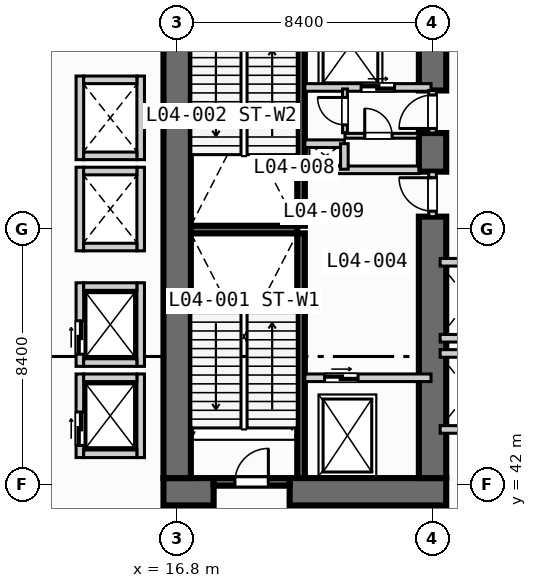
"""IFC4 building model, lengths in metres.
Left out: names, types, materials, properties, quantities, classifications, styles, units other than length and angle.
Written with IfcOpenShell. Run it as: python <this file> out.ifc"""

import sys

from ifc_helpers import new_model, si_unit, direction, frame, frame_2d, origin, place, context, subcontext, project, spatial, rectangle, extrude, element, fill, save


model = new_model("IFC4")
c1 = context("Model", 3, precision=1e-05, world=origin(), true_north=direction((0.0, 1.0)))
c2 = subcontext(c1, "Body", "Model", "MODEL_VIEW")
j1 = project(units=[si_unit("LENGTHUNIT", "METRE"), si_unit("PLANEANGLEUNIT", "RADIAN")], contexts=[c1])
p1 = place(None, origin())
s1 = spatial("IfcSite", under=j1, at=p1, CompositionType="ELEMENT")
p2 = place(p1, origin())
s2 = spatial("IfcBuilding", under=s1, at=p2, CompositionType="ELEMENT")
p3 = place(p2, frame((0.0, 0.0, 20.8)))
s3 = spatial("IfcBuildingStorey", under=s2, at=p3, CompositionType="ELEMENT", Elevation=20.8)
for number, where, z_axis, x_axis in (
    (1, (20.875, 42.2, 0.0), (0.0, 0.0, 1.0), (0.0, 1.0, 0.0)),
    (2, (20.875, 50.5, 0.0), (0.0, 0.0, 1.0), (0.0, 1.0, 0.0)),
):
    element("IfcWall", number, at=place(p3, frame(where, z_axis=z_axis, x_axis=x_axis)), inside=s3, PredefinedType="SOLIDWALL", context=c2, shape_type="SweptSolid", body=[
        extrude(rectangle(XDim=8.05, YDim=0.25, at=frame_2d((4.025, 0.0))), origin(), (0.0, 0.0, 1.0), 4.75),
    ])
p4 = place(p3, frame((17.25, 50.375, 0.0), z_axis=(0.0, 0.0, 1.0), x_axis=(1.0, 0.0, 0.0)))
e3 = element("IfcWall", 3, at=p4, inside=s3, PredefinedType="SOLIDWALL", context=c2, shape_type="SweptSolid", body=[
    extrude(rectangle(XDim=3.5, YDim=0.25, at=frame_2d((1.75, 0.0))), origin(), (0.0, 0.0, 1.0), 4.75),
])
p5 = place(p3, frame((16.35, 41.75, 0.0), z_axis=(0.0, 0.0, 1.0), x_axis=(1.0, 0.0, 0.0)))
e4 = element("IfcWall", 4, at=p5, inside=s3, PredefinedType="SHEAR", context=c2, shape_type="SweptSolid", body=[
    extrude(rectangle(XDim=1.65, YDim=0.9, at=frame_2d((0.825, 0.0))), origin(), (0.0, 0.0, 1.0), 4.75),
])
p6 = place(p3, frame((20.5, 41.75, 0.0), z_axis=(0.0, 0.0, 1.0), x_axis=(1.0, 0.0, 0.0)))
e5 = element("IfcWall", 5, at=p6, inside=s3, PredefinedType="SHEAR", context=c2, shape_type="SweptSolid", body=[
    extrude(rectangle(XDim=5.15, YDim=0.9, at=frame_2d((2.575, 0.0))), origin(), (0.0, 0.0, 1.0), 4.75),
])
p7 = place(p3, frame((16.8, 42.2, 0.0), z_axis=(0.0, 0.0, 1.0), x_axis=(0.0, 1.0, 0.0)))
e6 = element("IfcWall", 6, at=p7, inside=s3, PredefinedType="SHEAR", context=c2, shape_type="SweptSolid", body=[
    extrude(rectangle(XDim=16.35, YDim=0.9, at=frame_2d((8.175, 0.0))), origin(), (0.0, 0.0, 1.0), 4.75),
])
p8 = place(p3, frame((25.2, 42.2, 0.0), z_axis=(0.0, 0.0, 1.0), x_axis=(0.0, 1.0, 0.0)))
e7 = element("IfcWall", 7, at=p8, inside=s3, PredefinedType="SHEAR", context=c2, shape_type="SweptSolid", body=[
    extrude(rectangle(XDim=8.6, YDim=0.9, at=frame_2d((4.3, 0.0))), origin(), (0.0, 0.0, 1.0), 4.75),
])
p9 = place(p3, frame((25.2, 52.28, 0.0), z_axis=(0.0, 0.0, 1.0), x_axis=(0.0, 1.0, 0.0)))
e8 = element("IfcWall", 8, at=p9, inside=s3, PredefinedType="SHEAR", context=c2, shape_type="SweptSolid", body=[
    extrude(rectangle(XDim=1.27, YDim=0.9, at=frame_2d((0.635, 0.0))), origin(), (0.0, 0.0, 1.0), 4.75),
])
p10 = place(p3, frame((25.2, 54.95, 0.0), z_axis=(0.0, 0.0, 1.0), x_axis=(0.0, 1.0, 0.0)))
e9 = element("IfcWall", 9, at=p10, inside=s3, PredefinedType="SHEAR", context=c2, shape_type="SweptSolid", body=[
    extrude(rectangle(XDim=3.6, YDim=0.9, at=frame_2d((1.8, 0.0))), origin(), (0.0, 0.0, 1.0), 4.75),
])
p11 = place(p3, frame((18.0, 42.075, 0.0), z_axis=(0.0, 0.0, 1.0), x_axis=(1.0, 0.0, 0.0)))
e10 = element("IfcWall", 10, at=p11, inside=s3, PredefinedType="SOLIDWALL", context=c2, shape_type="SweptSolid", body=[
    extrude(rectangle(XDim=2.5, YDim=0.25, at=frame_2d((1.25, 0.0))), origin(), (0.0, 0.0, 1.0), 4.75),
])
p12 = place(p11, frame((0.7, 0.0, 0.0)))
e11 = element("IfcOpeningElement", 11, at=p12, cuts=e10, PredefinedType="OPENING", context=c2, shape_type="SweptSolid", body=[
    extrude(rectangle(XDim=1.1, YDim=2.15, at=frame_2d((0.55, 1.075))), frame((0.0, 0.135, 0.0), z_axis=(0.0, -1.0, 0.0), x_axis=(1.0, 0.0, 0.0)), (0.0, 0.0, 1.0), 0.27),
])
p13 = place(p3, frame((21.0, 45.5, 0.0), z_axis=(0.0, 0.0, 1.0), x_axis=(1.0, 0.0, 0.0)))
e12 = element("IfcWall", 12, at=p13, inside=s3, PredefinedType="SOLIDWALL", context=c2, shape_type="SweptSolid", body=[
    extrude(rectangle(XDim=4.15, YDim=0.25, at=frame_2d((2.075, 0.0))), origin(), (0.0, 0.0, 1.0), 4.75),
])
p14 = place(p13, frame((0.65, 0.0, 0.0)))
e13 = element("IfcOpeningElement", 13, at=p14, cuts=e12, PredefinedType="OPENING", context=c2, shape_type="SweptSolid", body=[
    extrude(rectangle(XDim=1.1, YDim=2.15, at=frame_2d((0.55, 1.075))), frame((0.0, 0.135, 0.0), z_axis=(0.0, -1.0, 0.0), x_axis=(1.0, 0.0, 0.0)), (0.0, 0.0, 1.0), 0.27),
])
p15 = place(p3, frame((25.2, 50.8, 0.0), z_axis=(0.0, 0.0, 1.0), x_axis=(0.0, 1.0, 0.0)))
e14 = element("IfcWall", 14, at=p15, inside=s3, PredefinedType="SOLIDWALL", context=c2, shape_type="SweptSolid", body=[
    extrude(rectangle(XDim=1.48, YDim=0.25, at=frame_2d((0.74, 0.0))), origin(), (0.0, 0.0, 1.0), 4.75),
])
p16 = place(p15, frame((0.18, 0.0, 0.0)))
e15 = element("IfcOpeningElement", 15, at=p16, cuts=e14, PredefinedType="OPENING", context=c2, shape_type="SweptSolid", body=[
    extrude(rectangle(XDim=1.1, YDim=2.15, at=frame_2d((0.55, 1.075))), frame((0.0, 0.135, 0.0), z_axis=(0.0, -1.0, 0.0), x_axis=(1.0, 0.0, 0.0)), (0.0, 0.0, 1.0), 0.27),
])
p17 = place(p3, frame((21.0, 52.34, 0.0), z_axis=(0.0, 0.0, 1.0), x_axis=(1.0, 0.0, 0.0)))
e16 = element("IfcWall", 16, at=p17, inside=s3, PredefinedType="SOLIDWALL", context=c2, shape_type="SweptSolid", body=[
    extrude(rectangle(XDim=3.75, YDim=0.25, at=frame_2d((1.875, 0.0))), origin(), (0.0, 0.0, 1.0), 4.75),
])
p18 = place(p3, frame((21.0, 55.05, 0.0), z_axis=(0.0, 0.0, 1.0), x_axis=(1.0, 0.0, 0.0)))
e17 = element("IfcWall", 17, at=p18, inside=s3, PredefinedType="SOLIDWALL", context=c2, shape_type="SweptSolid", body=[
    extrude(rectangle(XDim=4.15, YDim=0.25, at=frame_2d((2.075, 0.0))), origin(), (0.0, 0.0, 1.0), 4.75),
])
p19 = place(p18, frame((1.85, 0.0, 0.0)))
e18 = element("IfcOpeningElement", 18, at=p19, cuts=e17, PredefinedType="OPENING", context=c2, shape_type="SweptSolid", body=[
    extrude(rectangle(XDim=1.1, YDim=2.15, at=frame_2d((0.55, 1.075))), frame((0.0, 0.135, 0.0), z_axis=(0.0, -1.0, 0.0), x_axis=(1.0, 0.0, 0.0)), (0.0, 0.0, 1.0), 0.27),
])
p20 = place(p3, frame((25.2, 53.55, 0.0), z_axis=(0.0, 0.0, 1.0), x_axis=(0.0, 1.0, 0.0)))
e19 = element("IfcWall", 19, at=p20, inside=s3, PredefinedType="SOLIDWALL", context=c2, shape_type="SweptSolid", body=[
    extrude(rectangle(XDim=1.4, YDim=0.25, at=frame_2d((0.7, 0.0))), origin(), (0.0, 0.0, 1.0), 4.75),
])
p21 = place(p20, frame((0.15, 0.0, 0.0)))
e20 = element("IfcOpeningElement", 20, at=p21, cuts=e19, PredefinedType="OPENING", context=c2, shape_type="SweptSolid", body=[
    extrude(rectangle(XDim=1.1, YDim=2.15, at=frame_2d((0.55, 1.075))), frame((0.0, 0.135, 0.0), z_axis=(0.0, -1.0, 0.0), x_axis=(1.0, 0.0, 0.0)), (0.0, 0.0, 1.0), 0.27),
])
p22 = place(p3, frame((21.0, 53.2, 0.0), z_axis=(0.0, 0.0, 1.0), x_axis=(1.0, 0.0, 0.0)))
e21 = element("IfcWall", 21, at=p22, inside=s3, PredefinedType="SOLIDWALL", context=c2, shape_type="SweptSolid", body=[
    extrude(rectangle(XDim=1.3, YDim=0.25, at=frame_2d((0.65, 0.0))), origin(), (0.0, 0.0, 1.0), 4.75),
])
p23 = place(p3, frame((22.3, 52.36, 0.0), z_axis=(0.0, 0.0, 1.0), x_axis=(0.0, 1.0, 0.0)))
e22 = element("IfcWall", 22, at=p23, inside=s3, PredefinedType="SOLIDWALL", context=c2, shape_type="SweptSolid", body=[
    extrude(rectangle(XDim=0.84, YDim=0.25, at=frame_2d((0.42, 0.0))), origin(), (0.0, 0.0, 1.0), 4.75),
])
p24 = place(p3, frame((22.32, 53.56, 0.0), z_axis=(0.0, 0.0, 1.0), x_axis=(0.0, 1.0, 0.0)))
e23 = element("IfcWall", 23, at=p24, inside=s3, PredefinedType="PARTITIONING", context=c2, shape_type="SweptSolid", body=[
    extrude(rectangle(XDim=1.44, YDim=0.16, at=frame_2d((0.72, 0.0))), origin(), (0.0, 0.0, 1.0), 4.75),
])
p25 = place(p24, frame((0.26, 0.0, 0.0)))
e24 = element("IfcOpeningElement", 24, at=p25, cuts=e23, PredefinedType="OPENING", context=c2, shape_type="SweptSolid", body=[
    extrude(rectangle(XDim=0.9, YDim=2.1, at=frame_2d((0.45, 1.05))), frame((0.0, 0.09, 0.0), z_axis=(0.0, -1.0, 0.0), x_axis=(1.0, 0.0, 0.0)), (0.0, 0.0, 1.0), 0.18),
])
p26 = place(p3, frame((22.32, 53.46, 0.0), z_axis=(0.0, 0.0, 1.0), x_axis=(1.0, 0.0, 0.0)))
e25 = element("IfcWall", 25, at=p26, inside=s3, PredefinedType="PARTITIONING", context=c2, shape_type="SweptSolid", body=[
    extrude(rectangle(XDim=2.4, YDim=0.16, at=frame_2d((1.2, 0.0))), origin(), (0.0, 0.0, 1.0), 4.75),
])
p27 = place(p26, frame((0.65, 0.0, 0.0)))
e26 = element("IfcOpeningElement", 26, at=p27, cuts=e25, PredefinedType="OPENING", context=c2, shape_type="SweptSolid", body=[
    extrude(rectangle(XDim=0.9, YDim=2.1, at=frame_2d((0.45, 1.05))), frame((0.0, 0.09, 0.0), z_axis=(0.0, -1.0, 0.0), x_axis=(1.0, 0.0, 0.0)), (0.0, 0.0, 1.0), 0.18),
])
p28 = place(p3, frame((13.6, 42.875, 0.0), z_axis=(0.0, 0.0, 1.0), x_axis=(0.0, 1.0, 0.0)))
e27 = element("IfcWall", 27, at=p28, inside=s3, PredefinedType="SOLIDWALL", context=c2, shape_type="SweptSolid", body=[
    extrude(rectangle(XDim=2.75, YDim=0.25, at=frame_2d((1.375, 0.0))), origin(), (0.0, 0.0, 1.0), 4.75),
])
p29 = place(p28, frame((0.4, 0.0, 0.0)))
e28 = element("IfcOpeningElement", 28, at=p29, cuts=e27, PredefinedType="OPENING", context=c2, shape_type="SweptSolid", body=[
    extrude(rectangle(XDim=1.1, YDim=2.15, at=frame_2d((0.55, 1.075))), frame((0.0, 0.135, 0.0), z_axis=(0.0, -1.0, 0.0), x_axis=(1.0, 0.0, 0.0)), (0.0, 0.0, 1.0), 0.27),
])
p30 = place(p3, frame((15.6, 42.875, 0.0), z_axis=(0.0, 0.0, 1.0), x_axis=(0.0, 1.0, 0.0)))
e29 = element("IfcWall", 29, at=p30, inside=s3, PredefinedType="SOLIDWALL", context=c2, shape_type="SweptSolid", body=[
    extrude(rectangle(XDim=2.75, YDim=0.25, at=frame_2d((1.375, 0.0))), origin(), (0.0, 0.0, 1.0), 4.75),
])
for number, where, z_axis, x_axis in (
    (30, (13.725, 43.0, 0.0), (0.0, 0.0, 1.0), (1.0, 0.0, 0.0)),
    (31, (13.725, 45.5, 0.0), (0.0, 0.0, 1.0), (1.0, 0.0, 0.0)),
):
    element("IfcWall", number, at=place(p3, frame(where, z_axis=z_axis, x_axis=x_axis)), inside=s3, PredefinedType="SOLIDWALL", context=c2, shape_type="SweptSolid", body=[
        extrude(rectangle(XDim=1.75, YDim=0.25, at=frame_2d((0.875, 0.0))), origin(), (0.0, 0.0, 1.0), 4.75),
    ])
p31 = place(p3, frame((13.6, 45.875, 0.0), z_axis=(0.0, 0.0, 1.0), x_axis=(0.0, 1.0, 0.0)))
e32 = element("IfcWall", 32, at=p31, inside=s3, PredefinedType="SOLIDWALL", context=c2, shape_type="SweptSolid", body=[
    extrude(rectangle(XDim=2.75, YDim=0.25, at=frame_2d((1.375, 0.0))), origin(), (0.0, 0.0, 1.0), 4.75),
])
p32 = place(p31, frame((0.4, 0.0, 0.0)))
e33 = element("IfcOpeningElement", 33, at=p32, cuts=e32, PredefinedType="OPENING", context=c2, shape_type="SweptSolid", body=[
    extrude(rectangle(XDim=1.1, YDim=2.15, at=frame_2d((0.55, 1.075))), frame((0.0, 0.135, 0.0), z_axis=(0.0, -1.0, 0.0), x_axis=(1.0, 0.0, 0.0)), (0.0, 0.0, 1.0), 0.27),
])
p33 = place(p3, frame((15.6, 45.875, 0.0), z_axis=(0.0, 0.0, 1.0), x_axis=(0.0, 1.0, 0.0)))
e34 = element("IfcWall", 34, at=p33, inside=s3, PredefinedType="SOLIDWALL", context=c2, shape_type="SweptSolid", body=[
    extrude(rectangle(XDim=2.75, YDim=0.25, at=frame_2d((1.375, 0.0))), origin(), (0.0, 0.0, 1.0), 4.75),
])
for number, where, z_axis, x_axis in (
    (35, (13.725, 46.0, 0.0), (0.0, 0.0, 1.0), (1.0, 0.0, 0.0)),
    (36, (13.725, 48.5, 0.0), (0.0, 0.0, 1.0), (1.0, 0.0, 0.0)),
):
    element("IfcWall", number, at=place(p3, frame(where, z_axis=z_axis, x_axis=x_axis)), inside=s3, PredefinedType="SOLIDWALL", context=c2, shape_type="SweptSolid", body=[
        extrude(rectangle(XDim=1.75, YDim=0.25, at=frame_2d((0.875, 0.0))), origin(), (0.0, 0.0, 1.0), 4.75),
    ])
for number, where, z_axis, x_axis in (
    (37, (13.6, 49.675, 0.0), (0.0, 0.0, 1.0), (0.0, 1.0, 0.0)),
    (38, (15.6, 49.675, 0.0), (0.0, 0.0, 1.0), (0.0, 1.0, 0.0)),
):
    element("IfcWall", number, at=place(p3, frame(where, z_axis=z_axis, x_axis=x_axis)), inside=s3, PredefinedType="SOLIDWALL", context=c2, shape_type="SweptSolid", body=[
        extrude(rectangle(XDim=2.75, YDim=0.25, at=frame_2d((1.375, 0.0))), origin(), (0.0, 0.0, 1.0), 4.75),
    ])
for number, where, z_axis, x_axis in (
    (39, (13.725, 49.8, 0.0), (0.0, 0.0, 1.0), (1.0, 0.0, 0.0)),
    (40, (13.725, 52.3, 0.0), (0.0, 0.0, 1.0), (1.0, 0.0, 0.0)),
):
    element("IfcWall", number, at=place(p3, frame(where, z_axis=z_axis, x_axis=x_axis)), inside=s3, PredefinedType="SOLIDWALL", context=c2, shape_type="SweptSolid", body=[
        extrude(rectangle(XDim=1.75, YDim=0.25, at=frame_2d((0.875, 0.0))), origin(), (0.0, 0.0, 1.0), 4.75),
    ])
for number, where, z_axis, x_axis in (
    (41, (13.6, 52.675, 0.0), (0.0, 0.0, 1.0), (0.0, 1.0, 0.0)),
    (42, (15.6, 52.675, 0.0), (0.0, 0.0, 1.0), (0.0, 1.0, 0.0)),
):
    element("IfcWall", number, at=place(p3, frame(where, z_axis=z_axis, x_axis=x_axis)), inside=s3, PredefinedType="SOLIDWALL", context=c2, shape_type="SweptSolid", body=[
        extrude(rectangle(XDim=2.75, YDim=0.25, at=frame_2d((1.375, 0.0))), origin(), (0.0, 0.0, 1.0), 4.75),
    ])
for number, where, z_axis, x_axis in (
    (43, (13.725, 52.8, 0.0), (0.0, 0.0, 1.0), (1.0, 0.0, 0.0)),
    (44, (13.725, 55.3, 0.0), (0.0, 0.0, 1.0), (1.0, 0.0, 0.0)),
):
    element("IfcWall", number, at=place(p3, frame(where, z_axis=z_axis, x_axis=x_axis)), inside=s3, PredefinedType="SOLIDWALL", context=c2, shape_type="SweptSolid", body=[
        extrude(rectangle(XDim=1.75, YDim=0.25, at=frame_2d((0.875, 0.0))), origin(), (0.0, 0.0, 1.0), 4.75),
    ])
for number, where, z_axis, x_axis in (
    (45, (25.45, 43.8, 0.0), (0.0, 0.0, 1.0), (1.0, 0.0, 0.0)),
    (46, (25.45, 46.3, 0.0), (0.0, 0.0, 1.0), (1.0, 0.0, 0.0)),
    (47, (25.45, 46.8, 0.0), (0.0, 0.0, 1.0), (1.0, 0.0, 0.0)),
    (48, (25.45, 49.3, 0.0), (0.0, 0.0, 1.0), (1.0, 0.0, 0.0)),
):
    element("IfcWall", number, at=place(p3, frame(where, z_axis=z_axis, x_axis=x_axis)), inside=s3, PredefinedType="SOLIDWALL", context=c2, shape_type="SweptSolid", body=[
        extrude(rectangle(XDim=1.825, YDim=0.25, at=frame_2d((0.913, 0.0))), origin(), (0.0, 0.0, 1.0), 4.75),
    ])
p34 = place(p12, origin())
e49 = element("IfcDoor", 49, at=p34, inside=s3, OperationType="SINGLE_SWING_RIGHT", PredefinedType="DOOR", context=c2, shape_type="SweptSolid", body=[
    extrude(rectangle(XDim=1.1, YDim=2.15, at=frame_2d((0.55, 1.075))), frame((0.0, 0.025, 0.0), z_axis=(0.0, -1.0, 0.0), x_axis=(1.0, 0.0, 0.0)), (0.0, 0.0, 1.0), 0.05),
])
fill(e11, e49)
p35 = place(p14, origin())
e50 = element("IfcDoor", 50, at=p35, inside=s3, OperationType="SLIDING_TO_LEFT", PredefinedType="DOOR", context=c2, shape_type="SweptSolid", body=[
    extrude(rectangle(XDim=1.1, YDim=2.15, at=frame_2d((0.55, 1.075))), frame((0.0, 0.025, 0.0), z_axis=(0.0, -1.0, 0.0), x_axis=(1.0, 0.0, 0.0)), (0.0, 0.0, 1.0), 0.05),
])
fill(e13, e50)
p36 = place(p16, origin())
e51 = element("IfcDoor", 51, at=p36, inside=s3, OperationType="SINGLE_SWING_RIGHT", PredefinedType="DOOR", context=c2, shape_type="SweptSolid", body=[
    extrude(rectangle(XDim=1.1, YDim=2.15, at=frame_2d((0.55, 1.075))), frame((0.0, 0.025, 0.0), z_axis=(0.0, -1.0, 0.0), x_axis=(1.0, 0.0, 0.0)), (0.0, 0.0, 1.0), 0.05),
])
fill(e15, e51)
p37 = place(p19, origin())
e52 = element("IfcDoor", 52, at=p37, inside=s3, OperationType="SLIDING_TO_LEFT", PredefinedType="DOOR", context=c2, shape_type="SweptSolid", body=[
    extrude(rectangle(XDim=1.1, YDim=2.15, at=frame_2d((0.55, 1.075))), frame((0.0, 0.025, 0.0), z_axis=(0.0, -1.0, 0.0), x_axis=(1.0, 0.0, 0.0)), (0.0, 0.0, 1.0), 0.05),
])
fill(e18, e52)
p38 = place(p21, origin())
e53 = element("IfcDoor", 53, at=p38, inside=s3, OperationType="SINGLE_SWING_LEFT", PredefinedType="DOOR", context=c2, shape_type="SweptSolid", body=[
    extrude(rectangle(XDim=1.1, YDim=2.15, at=frame_2d((0.55, 1.075))), frame((0.0, 0.025, 0.0), z_axis=(0.0, -1.0, 0.0), x_axis=(1.0, 0.0, 0.0)), (0.0, 0.0, 1.0), 0.05),
])
fill(e20, e53)
p39 = place(p25, origin())
e54 = element("IfcDoor", 54, at=p39, inside=s3, OperationType="SINGLE_SWING_RIGHT", PredefinedType="DOOR", context=c2, shape_type="SweptSolid", body=[
    extrude(rectangle(XDim=0.9, YDim=2.1, at=frame_2d((0.45, 1.05))), frame((0.0, 0.025, 0.0), z_axis=(0.0, -1.0, 0.0), x_axis=(1.0, 0.0, 0.0)), (0.0, 0.0, 1.0), 0.05),
])
fill(e24, e54)
p40 = place(p27, origin())
e55 = element("IfcDoor", 55, at=p40, inside=s3, OperationType="SINGLE_SWING_LEFT", PredefinedType="DOOR", context=c2, shape_type="SweptSolid", body=[
    extrude(rectangle(XDim=0.9, YDim=2.1, at=frame_2d((0.45, 1.05))), frame((0.0, 0.025, 0.0), z_axis=(0.0, -1.0, 0.0), x_axis=(1.0, 0.0, 0.0)), (0.0, 0.0, 1.0), 0.05),
])
fill(e26, e55)
p41 = place(p29, origin())
e56 = element("IfcDoor", 56, at=p41, inside=s3, OperationType="SLIDING_TO_LEFT", PredefinedType="DOOR", context=c2, shape_type="SweptSolid", body=[
    extrude(rectangle(XDim=1.1, YDim=2.15, at=frame_2d((0.55, 1.075))), frame((0.0, 0.025, 0.0), z_axis=(0.0, -1.0, 0.0), x_axis=(1.0, 0.0, 0.0)), (0.0, 0.0, 1.0), 0.05),
])
fill(e28, e56)
p42 = place(p32, origin())
e57 = element("IfcDoor", 57, at=p42, inside=s3, OperationType="SLIDING_TO_LEFT", PredefinedType="DOOR", context=c2, shape_type="SweptSolid", body=[
    extrude(rectangle(XDim=1.1, YDim=2.15, at=frame_2d((0.55, 1.075))), frame((0.0, 0.025, 0.0), z_axis=(0.0, -1.0, 0.0), x_axis=(1.0, 0.0, 0.0)), (0.0, 0.0, 1.0), 0.05),
])
fill(e33, e57)
save(model, sys.argv[1])
